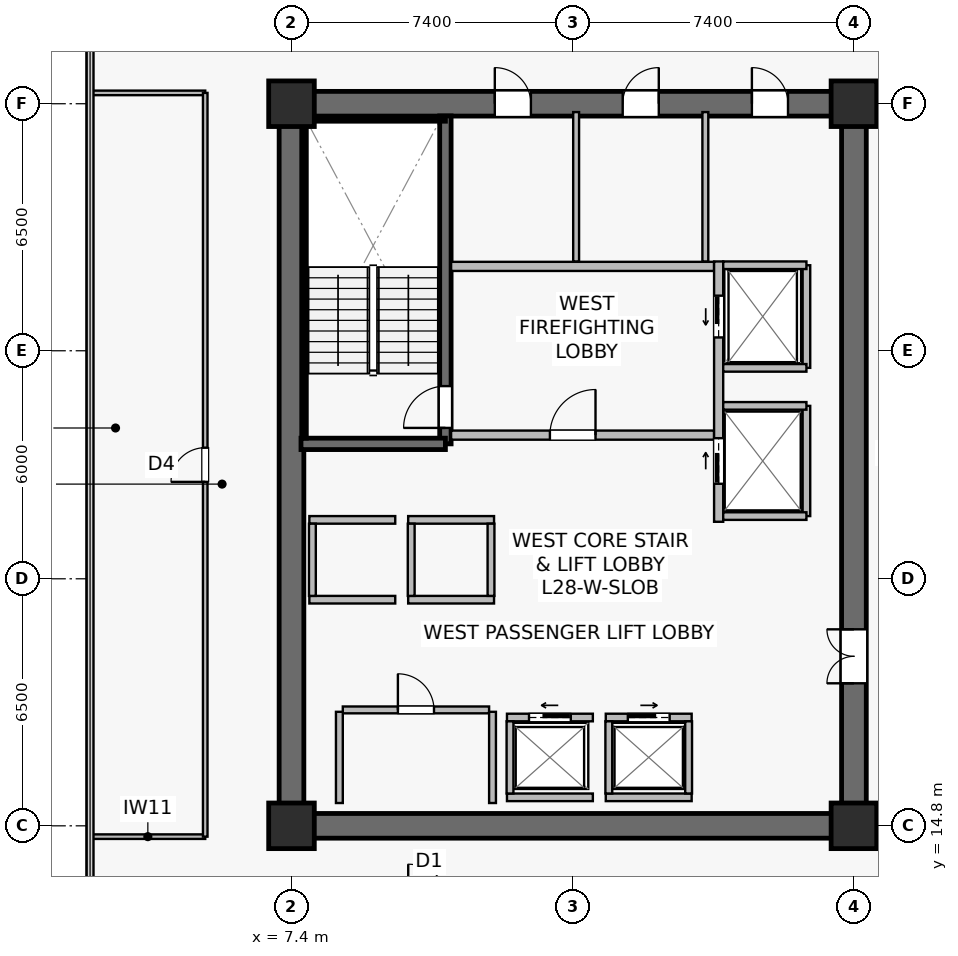
"""IFC4 building model, lengths in metres.
Left out: names, types, materials, properties, quantities, classifications, styles, units other than length and angle.
Written with IfcOpenShell. Run it as: python <this file> out.ifc"""

import sys

from ifc_helpers import new_model, si_unit, direction, frame, frame_2d, origin, origin_2d, place, context, subcontext, project, spatial, rectangle, extrude, source, transform, mapped, element, fill, save


model = new_model("IFC4")
c1 = context("Model", 3, precision=1e-05, world=origin(), true_north=direction((0.0, 1.0)))
c2 = subcontext(c1, "Body", "Model", "MODEL_VIEW")
j1 = project(units=[si_unit("LENGTHUNIT", "METRE"), si_unit("PLANEANGLEUNIT", "RADIAN")], contexts=[c1])
p1 = place(None, origin())
s1 = spatial("IfcSite", under=j1, at=p1, CompositionType="ELEMENT")
p2 = place(p1, origin())
s2 = spatial("IfcBuilding", under=s1, at=p2, CompositionType="ELEMENT")
p3 = place(p2, frame((0.0, 0.0, 117.4)))
s3 = spatial("IfcBuildingStorey", under=s2, at=p3, CompositionType="ELEMENT", Elevation=117.4)
p4 = place(p3, frame((7.075, 14.8, 0.0), z_axis=(0.0, 0.0, 1.0), x_axis=(1.0, 0.0, 0.0)))
e1 = element("IfcWall", 1, at=p4, inside=s3, PredefinedType="SHEAR", context=c2, shape_type="SweptSolid", body=[
    extrude(rectangle(XDim=15.45, YDim=0.65, at=frame_2d((7.725, 0.0))), origin(), (0.0, 0.0, 1.0), 3.79),
])
p5 = place(p3, frame((7.075, 33.8, 0.0), z_axis=(0.0, 0.0, 1.0), x_axis=(1.0, 0.0, 0.0)))
e2 = element("IfcWall", 2, at=p5, inside=s3, PredefinedType="SHEAR", context=c2, shape_type="SweptSolid", body=[
    extrude(rectangle(XDim=15.45, YDim=0.65, at=frame_2d((7.725, 0.0))), origin(), (0.0, 0.0, 1.0), 3.79),
])
p6 = place(p5, frame((5.675, 0.0, 0.0)))
e3 = element("IfcOpeningElement", 3, at=p6, cuts=e2, PredefinedType="OPENING", context=c2, shape_type="SweptSolid", body=[
    extrude(rectangle(XDim=0.95, YDim=2.15, at=frame_2d((0.475, 1.075))), frame((0.0, 0.335, 0.0), z_axis=(0.0, -1.0, 0.0), x_axis=(1.0, 0.0, 0.0)), (0.0, 0.0, 1.0), 0.67),
])
p7 = place(p5, frame((9.04, 0.0, 0.0)))
e4 = element("IfcOpeningElement", 4, at=p7, cuts=e2, PredefinedType="OPENING", context=c2, shape_type="SweptSolid", body=[
    extrude(rectangle(XDim=0.95, YDim=2.15, at=frame_2d((0.475, 1.075))), frame((0.0, 0.335, 0.0), z_axis=(0.0, -1.0, 0.0), x_axis=(1.0, 0.0, 0.0)), (0.0, 0.0, 1.0), 0.67),
])
p8 = place(p5, frame((12.44, 0.0, 0.0)))
e5 = element("IfcOpeningElement", 5, at=p8, cuts=e2, PredefinedType="OPENING", context=c2, shape_type="SweptSolid", body=[
    extrude(rectangle(XDim=0.95, YDim=2.15, at=frame_2d((0.475, 1.075))), frame((0.0, 0.335, 0.0), z_axis=(0.0, -1.0, 0.0), x_axis=(1.0, 0.0, 0.0)), (0.0, 0.0, 1.0), 0.67),
])
p9 = place(p3, frame((7.4, 15.125, 0.0), z_axis=(0.0, 0.0, 1.0), x_axis=(0.0, 1.0, 0.0)))
e6 = element("IfcWall", 6, at=p9, inside=s3, PredefinedType="SHEAR", context=c2, shape_type="SweptSolid", body=[
    extrude(rectangle(XDim=18.35, YDim=0.65, at=frame_2d((9.175, 0.0))), origin(), (0.0, 0.0, 1.0), 3.79),
])
p10 = place(p3, frame((22.2, 15.125, 0.0), z_axis=(0.0, 0.0, 1.0), x_axis=(0.0, 1.0, 0.0)))
e7 = element("IfcWall", 7, at=p10, inside=s3, PredefinedType="SHEAR", context=c2, shape_type="SweptSolid", body=[
    extrude(rectangle(XDim=18.35, YDim=0.65, at=frame_2d((9.175, 0.0))), origin(), (0.0, 0.0, 1.0), 3.79),
])
p11 = place(p10, frame((3.425, 0.0, 0.0)))
e8 = element("IfcOpeningElement", 8, at=p11, cuts=e7, PredefinedType="OPENING", context=c2, shape_type="SweptSolid", body=[
    extrude(rectangle(XDim=1.42, YDim=2.2, at=frame_2d((0.71, 1.1))), frame((0.0, 0.335, 0.0), z_axis=(0.0, -1.0, 0.0), x_axis=(1.0, 0.0, 0.0)), (0.0, 0.0, 1.0), 0.67),
])
p12 = place(p3, frame((11.45, 24.85, 0.0), z_axis=(0.0, 0.0, 1.0), x_axis=(0.0, 1.0, 0.0)))
e9 = element("IfcWall", 9, at=p12, inside=s3, PredefinedType="SHEAR", context=c2, shape_type="SweptSolid", body=[
    extrude(rectangle(XDim=8.63, YDim=0.3, at=frame_2d((4.315, 0.0))), origin(), (0.0, 0.0, 1.0), 3.79),
])
p13 = place(p12, frame((0.42, 0.0, 0.0)))
e10 = element("IfcOpeningElement", 10, at=p13, cuts=e9, PredefinedType="OPENING", context=c2, shape_type="SweptSolid", body=[
    extrude(rectangle(XDim=1.1, YDim=2.15, at=frame_2d((0.55, 1.075))), frame((0.0, 0.16, 0.0), z_axis=(0.0, -1.0, 0.0), x_axis=(1.0, 0.0, 0.0)), (0.0, 0.0, 1.0), 0.32),
])
p14 = place(p3, frame((7.65, 24.85, 0.0), z_axis=(0.0, 0.0, 1.0), x_axis=(1.0, 0.0, 0.0)))
e11 = element("IfcWall", 11, at=p14, inside=s3, PredefinedType="SHEAR", context=c2, shape_type="SweptSolid", body=[
    extrude(rectangle(XDim=3.8, YDim=0.3, at=frame_2d((1.9, 0.0))), origin(), (0.0, 0.0, 1.0), 3.79),
])
p15 = place(p3, frame((7.73, 33.4, 0.0), z_axis=(0.0, 0.0, 1.0), x_axis=(1.0, 0.0, 0.0)))
e12 = element("IfcWall", 12, at=p15, inside=s3, PredefinedType="SOLIDWALL", context=c2, shape_type="SweptSolid", body=[
    extrude(rectangle(XDim=3.72, YDim=0.12, at=frame_2d((1.86, 0.0))), origin(), (0.0, 0.0, 1.0), 3.79),
])
p16 = place(p3, frame((7.73, 25.0, 0.0), z_axis=(0.0, 0.0, 1.0), x_axis=(0.0, 1.0, 0.0)))
e13 = element("IfcWall", 13, at=p16, inside=s3, PredefinedType="SOLIDWALL", context=c2, shape_type="SweptSolid", body=[
    extrude(rectangle(XDim=8.32, YDim=0.12, at=frame_2d((4.16, 0.0))), origin(), (0.0, 0.0, 1.0), 3.79),
])
m1 = source(origin(), c2, "Body", "SweptSolid", [
    extrude(rectangle(XDim=1.2, YDim=1.2, at=origin_2d()), origin(), (0.0, 0.0, 1.0), 4.1),
])
for number, where, z_axis, x_axis in (
    (14, (7.4, 14.8, 0.0), (0.0, 0.0, 1.0), (1.0, 0.0, 0.0)),
    (15, (22.2, 14.8, 0.0), (0.0, 0.0, 1.0), (1.0, 0.0, 0.0)),
    (16, (7.4, 33.8, 0.0), (0.0, 0.0, 1.0), (1.0, 0.0, 0.0)),
    (17, (22.2, 33.8, 0.0), (0.0, 0.0, 1.0), (1.0, 0.0, 0.0)),
):
    element("IfcColumn", number, at=place(p3, frame(where, z_axis=z_axis, x_axis=x_axis)), inside=s3, PredefinedType="COLUMN", context=c2, shape_type="MappedRepresentation", body=[
        mapped(m1, transform((0.0, 0.0, 0.0), scale=1.0)),
    ])
p17 = place(p3, frame((11.6, 25.08, 0.0), z_axis=(0.0, 0.0, 1.0), x_axis=(1.0, 0.0, 0.0)))
e18 = element("IfcWall", 18, at=p17, inside=s3, PredefinedType="SOLIDWALL", context=c2, shape_type="SweptSolid", body=[
    extrude(rectangle(XDim=6.92, YDim=0.24, at=frame_2d((3.46, 0.0))), origin(), (0.0, 0.0, 1.0), 3.125),
])
p18 = place(p17, frame((2.6, 0.0, 0.0)))
e19 = element("IfcOpeningElement", 19, at=p18, cuts=e18, PredefinedType="OPENING", context=c2, shape_type="SweptSolid", body=[
    extrude(rectangle(XDim=1.2, YDim=2.16, at=frame_2d((0.6, 1.08))), frame((0.0, 0.13, 0.0), z_axis=(0.0, -1.0, 0.0), x_axis=(1.0, 0.0, 0.0)), (0.0, 0.0, 1.0), 0.26),
])
p19 = place(p3, frame((11.6, 29.52, 0.0), z_axis=(0.0, 0.0, 1.0), x_axis=(1.0, 0.0, 0.0)))
e20 = element("IfcWall", 20, at=p19, inside=s3, PredefinedType="SOLIDWALL", context=c2, shape_type="SweptSolid", body=[
    extrude(rectangle(XDim=6.92, YDim=0.24, at=frame_2d((3.46, 0.0))), origin(), (0.0, 0.0, 1.0), 3.125),
])
p20 = place(p3, frame((18.64, 22.8, 0.0), z_axis=(0.0, 0.0, 1.0), x_axis=(0.0, 1.0, 0.0)))
e21 = element("IfcWall", 21, at=p20, inside=s3, PredefinedType="SOLIDWALL", context=c2, shape_type="SweptSolid", body=[
    extrude(rectangle(XDim=6.85, YDim=0.24, at=frame_2d((3.425, 0.0))), origin(), (0.0, 0.0, 1.0), 2.875),
])
p21 = place(p20, frame((4.85, 0.0, 0.0)))
e22 = element("IfcOpeningElement", 22, at=p21, cuts=e21, PredefinedType="OPENING", context=c2, shape_type="SweptSolid", body=[
    extrude(rectangle(XDim=1.1, YDim=2.22, at=frame_2d((0.55, 1.11))), frame((0.0, 0.13, 0.0), z_axis=(0.0, -1.0, 0.0), x_axis=(1.0, 0.0, 0.0)), (0.0, 0.0, 1.0), 0.26),
])
p22 = place(p20, frame((1.0, 0.0, 0.0)))
e23 = element("IfcOpeningElement", 23, at=p22, cuts=e21, PredefinedType="OPENING", context=c2, shape_type="SweptSolid", body=[
    extrude(rectangle(XDim=1.2, YDim=2.22, at=frame_2d((0.6, 1.11))), frame((0.0, 0.13, 0.0), z_axis=(0.0, -1.0, 0.0), x_axis=(1.0, 0.0, 0.0)), (0.0, 0.0, 1.0), 0.26),
])
p23 = place(p3, frame((13.07, 17.65, 0.0), z_axis=(0.0, 0.0, 1.0), x_axis=(1.0, 0.0, 0.0)))
e24 = element("IfcWall", 24, at=p23, inside=s3, PredefinedType="SOLIDWALL", context=c2, shape_type="SweptSolid", body=[
    extrude(rectangle(XDim=2.26, YDim=0.2, at=frame_2d((1.13, 0.0))), origin(), (0.0, 0.0, 1.0), 3.125),
])
p24 = place(p23, frame((0.58, 0.0, 0.0)))
e25 = element("IfcOpeningElement", 25, at=p24, cuts=e24, PredefinedType="OPENING", context=c2, shape_type="SweptSolid", body=[
    extrude(rectangle(XDim=1.1, YDim=2.22, at=frame_2d((0.55, 1.11))), frame((0.0, 0.11, 0.0), z_axis=(0.0, -1.0, 0.0), x_axis=(1.0, 0.0, 0.0)), (0.0, 0.0, 1.0), 0.22),
])
p25 = place(p3, frame((13.07, 15.55, 0.0), z_axis=(0.0, 0.0, 1.0), x_axis=(1.0, 0.0, 0.0)))
e26 = element("IfcWall", 26, at=p25, inside=s3, PredefinedType="SOLIDWALL", context=c2, shape_type="SweptSolid", body=[
    extrude(rectangle(XDim=2.26, YDim=0.2, at=frame_2d((1.13, 0.0))), origin(), (0.0, 0.0, 1.0), 3.125),
])
p26 = place(p3, frame((13.15, 15.65, 0.0), z_axis=(0.0, 0.0, 1.0), x_axis=(0.0, 1.0, 0.0)))
e27 = element("IfcWall", 27, at=p26, inside=s3, PredefinedType="SOLIDWALL", context=c2, shape_type="SweptSolid", body=[
    extrude(rectangle(XDim=1.9, YDim=0.18, at=frame_2d((0.95, 0.0))), origin(), (0.0, 0.0, 1.0), 3.79),
])
p27 = place(p3, frame((15.67, 17.65, 0.0), z_axis=(0.0, 0.0, 1.0), x_axis=(1.0, 0.0, 0.0)))
e28 = element("IfcWall", 28, at=p27, inside=s3, PredefinedType="SOLIDWALL", context=c2, shape_type="SweptSolid", body=[
    extrude(rectangle(XDim=2.26, YDim=0.2, at=frame_2d((1.13, 0.0))), origin(), (0.0, 0.0, 1.0), 3.79),
])
p28 = place(p27, frame((0.58, 0.0, 0.0)))
e29 = element("IfcOpeningElement", 29, at=p28, cuts=e28, PredefinedType="OPENING", context=c2, shape_type="SweptSolid", body=[
    extrude(rectangle(XDim=1.1, YDim=2.22, at=frame_2d((0.55, 1.11))), frame((0.0, 0.11, 0.0), z_axis=(0.0, -1.0, 0.0), x_axis=(1.0, 0.0, 0.0)), (0.0, 0.0, 1.0), 0.22),
])
p29 = place(p3, frame((15.67, 15.55, 0.0), z_axis=(0.0, 0.0, 1.0), x_axis=(1.0, 0.0, 0.0)))
e30 = element("IfcWall", 30, at=p29, inside=s3, PredefinedType="SOLIDWALL", context=c2, shape_type="SweptSolid", body=[
    extrude(rectangle(XDim=2.26, YDim=0.2, at=frame_2d((1.13, 0.0))), origin(), (0.0, 0.0, 1.0), 3.79),
])
for number, where, z_axis, x_axis in (
    (31, (15.75, 15.65, 0.0), (0.0, 0.0, 1.0), (0.0, 1.0, 0.0)),
    (32, (17.85, 15.65, 0.0), (0.0, 0.0, 1.0), (0.0, 1.0, 0.0)),
):
    element("IfcWall", number, at=place(p3, frame(where, z_axis=z_axis, x_axis=x_axis)), inside=s3, PredefinedType="SOLIDWALL", context=c2, shape_type="SweptSolid", body=[
        extrude(rectangle(XDim=1.9, YDim=0.18, at=frame_2d((0.95, 0.0))), origin(), (0.0, 0.0, 1.0), 3.79),
    ])
for number, where, z_axis, x_axis in (
    (33, (7.87, 20.75, 0.0), (0.0, 0.0, 1.0), (1.0, 0.0, 0.0)),
    (34, (7.87, 22.85, 0.0), (0.0, 0.0, 1.0), (1.0, 0.0, 0.0)),
):
    element("IfcWall", number, at=place(p3, frame(where, z_axis=z_axis, x_axis=x_axis)), inside=s3, PredefinedType="SOLIDWALL", context=c2, shape_type="SweptSolid", body=[
        extrude(rectangle(XDim=2.26, YDim=0.2, at=frame_2d((1.13, 0.0))), origin(), (0.0, 0.0, 1.0), 3.79),
    ])
p30 = place(p3, frame((7.95, 20.85, 0.0), z_axis=(0.0, 0.0, 1.0), x_axis=(0.0, 1.0, 0.0)))
e35 = element("IfcWall", 35, at=p30, inside=s3, PredefinedType="SOLIDWALL", context=c2, shape_type="SweptSolid", body=[
    extrude(rectangle(XDim=1.9, YDim=0.18, at=frame_2d((0.95, 0.0))), origin(), (0.0, 0.0, 1.0), 3.79),
])
for number, where, z_axis, x_axis in (
    (36, (10.47, 20.75, 0.0), (0.0, 0.0, 1.0), (1.0, 0.0, 0.0)),
    (37, (10.47, 22.85, 0.0), (0.0, 0.0, 1.0), (1.0, 0.0, 0.0)),
):
    element("IfcWall", number, at=place(p3, frame(where, z_axis=z_axis, x_axis=x_axis)), inside=s3, PredefinedType="SOLIDWALL", context=c2, shape_type="SweptSolid", body=[
        extrude(rectangle(XDim=2.26, YDim=0.2, at=frame_2d((1.13, 0.0))), origin(), (0.0, 0.0, 1.0), 3.79),
    ])
for number, where, z_axis, x_axis in (
    (38, (10.55, 20.85, 0.0), (0.0, 0.0, 1.0), (0.0, 1.0, 0.0)),
    (39, (12.65, 20.85, 0.0), (0.0, 0.0, 1.0), (0.0, 1.0, 0.0)),
):
    element("IfcWall", number, at=place(p3, frame(where, z_axis=z_axis, x_axis=x_axis)), inside=s3, PredefinedType="SOLIDWALL", context=c2, shape_type="SweptSolid", body=[
        extrude(rectangle(XDim=1.9, YDim=0.18, at=frame_2d((0.95, 0.0))), origin(), (0.0, 0.0, 1.0), 3.79),
    ])
p31 = place(p3, frame((20.95, 26.85, 0.0), z_axis=(0.0, 0.0, 1.0), x_axis=(0.0, 1.0, 0.0)))
e40 = element("IfcWall", 40, at=p31, inside=s3, PredefinedType="SOLIDWALL", context=c2, shape_type="SweptSolid", body=[
    extrude(rectangle(XDim=2.7, YDim=0.2, at=frame_2d((1.35, 0.0))), origin(), (0.0, 0.0, 1.0), 3.79),
])
p32 = place(p3, frame((18.76, 29.55, 0.0), z_axis=(0.0, 0.0, 1.0), x_axis=(1.0, 0.0, 0.0)))
e41 = element("IfcWall", 41, at=p32, inside=s3, PredefinedType="SOLIDWALL", context=c2, shape_type="SweptSolid", body=[
    extrude(rectangle(XDim=2.19, YDim=0.2, at=frame_2d((1.095, 0.0))), origin(), (0.0, 0.0, 1.0), 3.79),
])
p33 = place(p3, frame((18.76, 26.85, 0.0), z_axis=(0.0, 0.0, 1.0), x_axis=(1.0, 0.0, 0.0)))
e42 = element("IfcWall", 42, at=p33, inside=s3, PredefinedType="SOLIDWALL", context=c2, shape_type="SweptSolid", body=[
    extrude(rectangle(XDim=2.19, YDim=0.2, at=frame_2d((1.095, 0.0))), origin(), (0.0, 0.0, 1.0), 3.187),
])
p34 = place(p3, frame((20.95, 22.95, 0.0), z_axis=(0.0, 0.0, 1.0), x_axis=(0.0, 1.0, 0.0)))
e43 = element("IfcWall", 43, at=p34, inside=s3, PredefinedType="SOLIDWALL", context=c2, shape_type="SweptSolid", body=[
    extrude(rectangle(XDim=2.9, YDim=0.2, at=frame_2d((1.45, 0.0))), origin(), (0.0, 0.0, 1.0), 2.875),
])
for number, where, z_axis, x_axis in (
    (44, (18.76, 25.85, 0.0), (0.0, 0.0, 1.0), (1.0, 0.0, 0.0)),
    (45, (18.76, 22.95, 0.0), (0.0, 0.0, 1.0), (1.0, 0.0, 0.0)),
):
    element("IfcWall", number, at=place(p3, frame(where, z_axis=z_axis, x_axis=x_axis)), inside=s3, PredefinedType="SOLIDWALL", context=c2, shape_type="SweptSolid", body=[
        extrude(rectangle(XDim=2.19, YDim=0.2, at=frame_2d((1.095, 0.0))), origin(), (0.0, 0.0, 1.0), 3.79),
    ])
p35 = place(p3, frame((8.75, 17.85, 0.0), z_axis=(0.0, 0.0, 1.0), x_axis=(1.0, 0.0, 0.0)))
e46 = element("IfcWall", 46, at=p35, inside=s3, PredefinedType="SOLIDWALL", context=c2, shape_type="SweptSolid", body=[
    extrude(rectangle(XDim=3.85, YDim=0.18, at=frame_2d((1.925, 0.0))), origin(), (0.0, 0.0, 1.0), 3.79),
])
p36 = place(p35, frame((1.45, 0.0, 0.0)))
e47 = element("IfcOpeningElement", 47, at=p36, cuts=e46, PredefinedType="OPENING", context=c2, shape_type="SweptSolid", body=[
    extrude(rectangle(XDim=0.95, YDim=2.15, at=frame_2d((0.475, 1.075))), frame((0.0, 0.1, 0.0), z_axis=(0.0, -1.0, 0.0), x_axis=(1.0, 0.0, 0.0)), (0.0, 0.0, 1.0), 0.2),
])
for number, where, z_axis, x_axis in (
    (48, (12.69, 15.4, 0.0), (0.0, 0.0, 1.0), (0.0, 1.0, 0.0)),
    (49, (8.66, 15.4, 0.0), (0.0, 0.0, 1.0), (0.0, 1.0, 0.0)),
):
    element("IfcWall", number, at=place(p3, frame(where, z_axis=z_axis, x_axis=x_axis)), inside=s3, PredefinedType="SOLIDWALL", context=c2, shape_type="SweptSolid", body=[
        extrude(rectangle(XDim=2.4, YDim=0.18, at=frame_2d((1.2, 0.0))), origin(), (0.0, 0.0, 1.0), 3.79),
    ])
p37 = place(p3, frame((14.89, 29.65, 0.0), z_axis=(0.0, 0.0, 1.0), x_axis=(0.0, 1.0, 0.0)))
e50 = element("IfcWall", 50, at=p37, inside=s3, PredefinedType="PLUMBINGWALL", context=c2, shape_type="SweptSolid", body=[
    extrude(rectangle(XDim=3.93, YDim=0.155, at=frame_2d((1.965, 0.0))), origin(), (0.0, 0.0, 1.0), 3.125),
])
p38 = place(p3, frame((18.29, 29.65, 0.0), z_axis=(0.0, 0.0, 1.0), x_axis=(0.0, 1.0, 0.0)))
e51 = element("IfcWall", 51, at=p38, inside=s3, PredefinedType="PLUMBINGWALL", context=c2, shape_type="SweptSolid", body=[
    extrude(rectangle(XDim=3.93, YDim=0.155, at=frame_2d((1.965, 0.0))), origin(), (0.0, 0.0, 1.0), 3.79),
])
for number, where, z_axis, x_axis in (
    (52, (2.11, 14.515, 0.0), (0.0, 0.0, 1.0), (1.0, 0.0, 0.0)),
    (53, (2.11, 34.085, 0.0), (0.0, 0.0, 1.0), (1.0, 0.0, 0.0)),
):
    element("IfcWall", number, at=place(p3, frame(where, z_axis=z_axis, x_axis=x_axis)), inside=s3, PredefinedType="PARTITIONING", context=c2, shape_type="SweptSolid", body=[
        extrude(rectangle(XDim=3.02, YDim=0.12, at=frame_2d((1.51, 0.0))), origin(), (0.0, 0.0, 1.0), 3.79),
    ])
p39 = place(p3, frame((5.13, 14.515, 0.0), z_axis=(0.0, 0.0, 1.0), x_axis=(0.0, 1.0, 0.0)))
e54 = element("IfcWall", 54, at=p39, inside=s3, PredefinedType="PARTITIONING", context=c2, shape_type="SweptSolid", body=[
    extrude(rectangle(XDim=19.57, YDim=0.12, at=frame_2d((9.785, 0.0))), origin(), (0.0, 0.0, 1.0), 3.79),
])
p40 = place(p39, frame((9.335, 0.0, 0.0)))
e55 = element("IfcOpeningElement", 55, at=p40, cuts=e54, PredefinedType="OPENING", context=c2, shape_type="SweptSolid", body=[
    extrude(rectangle(XDim=0.9, YDim=2.1, at=frame_2d((0.45, 1.05))), frame((0.0, 0.07, 0.0), z_axis=(0.0, -1.0, 0.0), x_axis=(1.0, 0.0, 0.0)), (0.0, 0.0, 1.0), 0.14),
])
m2 = source(origin(), c2, "Body", "SweptSolid", [
    extrude(rectangle(XDim=1.1, YDim=2.15, at=frame_2d((0.55, 1.075))), frame((0.0, 0.025, 0.0), z_axis=(0.0, -1.0, 0.0), x_axis=(1.0, 0.0, 0.0)), (0.0, 0.0, 1.0), 0.05),
])
p41 = place(p13, origin())
e56 = element("IfcDoor", 56, at=p41, inside=s3, OperationType="SINGLE_SWING_LEFT", PredefinedType="DOOR", context=c2, shape_type="MappedRepresentation", body=[
    mapped(m2, transform((0.0, 0.0, 0.0), scale=1.0)),
])
fill(e10, e56)
m3 = source(origin(), c2, "Body", "SweptSolid", [
    extrude(rectangle(XDim=1.2, YDim=2.16, at=frame_2d((0.6, 1.08))), frame((0.0, 0.025, 0.0), z_axis=(0.0, -1.0, 0.0), x_axis=(1.0, 0.0, 0.0)), (0.0, 0.0, 1.0), 0.05),
])
p42 = place(p18, origin())
e57 = element("IfcDoor", 57, at=p42, inside=s3, OperationType="SINGLE_SWING_RIGHT", PredefinedType="DOOR", context=c2, shape_type="MappedRepresentation", body=[
    mapped(m3, transform((0.0, 0.0, 0.0), scale=1.0)),
])
fill(e19, e57)
m4 = source(origin(), c2, "Body", "SweptSolid", [
    extrude(rectangle(XDim=1.1, YDim=2.22, at=frame_2d((0.55, 1.11))), frame((0.0, 0.025, 0.0), z_axis=(0.0, -1.0, 0.0), x_axis=(1.0, 0.0, 0.0)), (0.0, 0.0, 1.0), 0.05),
])
p43 = place(p24, origin())
e58 = element("IfcDoor", 58, at=p43, inside=s3, OperationType="SLIDING_TO_LEFT", PredefinedType="USERDEFINED", context=c2, shape_type="MappedRepresentation", body=[
    mapped(m4, transform((0.0, 0.0, 0.0), scale=1.0)),
])
fill(e25, e58)
p44 = place(p28, origin())
e59 = element("IfcDoor", 59, at=p44, inside=s3, OperationType="SLIDING_TO_RIGHT", PredefinedType="USERDEFINED", context=c2, shape_type="MappedRepresentation", body=[
    mapped(m4, transform((0.0, 0.0, 0.0), scale=1.0)),
])
fill(e29, e59)
p45 = place(p21, origin())
e60 = element("IfcDoor", 60, at=p45, inside=s3, OperationType="SLIDING_TO_LEFT", PredefinedType="USERDEFINED", context=c2, shape_type="MappedRepresentation", body=[
    mapped(m4, transform((0.0, 0.0, 0.0), scale=1.0)),
])
fill(e22, e60)
m5 = source(origin(), c2, "Body", "SweptSolid", [
    extrude(rectangle(XDim=1.2, YDim=2.22, at=frame_2d((0.6, 1.11))), frame((0.0, 0.025, 0.0), z_axis=(0.0, -1.0, 0.0), x_axis=(1.0, 0.0, 0.0)), (0.0, 0.0, 1.0), 0.05),
])
p46 = place(p22, origin())
e61 = element("IfcDoor", 61, at=p46, inside=s3, OperationType="SLIDING_TO_RIGHT", PredefinedType="USERDEFINED", context=c2, shape_type="MappedRepresentation", body=[
    mapped(m5, transform((0.0, 0.0, 0.0), scale=1.0)),
])
fill(e23, e61)
m6 = source(origin(), c2, "Body", "SweptSolid", [
    extrude(rectangle(XDim=0.95, YDim=2.15, at=frame_2d((0.475, 1.075))), frame((0.0, 0.025, 0.0), z_axis=(0.0, -1.0, 0.0), x_axis=(1.0, 0.0, 0.0)), (0.0, 0.0, 1.0), 0.05),
])
p47 = place(p36, origin())
e62 = element("IfcDoor", 62, at=p47, inside=s3, OperationType="SINGLE_SWING_LEFT", PredefinedType="DOOR", context=c2, shape_type="MappedRepresentation", body=[
    mapped(m6, transform((0.0, 0.0, 0.0), scale=1.0)),
])
fill(e47, e62)
m7 = source(origin(), c2, "Body", "SweptSolid", [
    extrude(rectangle(XDim=1.42, YDim=2.2, at=frame_2d((0.71, 1.1))), frame((0.0, 0.025, 0.0), z_axis=(0.0, -1.0, 0.0), x_axis=(1.0, 0.0, 0.0)), (0.0, 0.0, 1.0), 0.05),
])
p48 = place(p11, origin())
e63 = element("IfcDoor", 63, at=p48, inside=s3, OperationType="DOUBLE_DOOR_SINGLE_SWING", PredefinedType="DOOR", context=c2, shape_type="MappedRepresentation", body=[
    mapped(m7, transform((0.0, 0.0, 0.0), scale=1.0)),
])
fill(e8, e63)
p49 = place(p6, origin())
e64 = element("IfcDoor", 64, at=p49, inside=s3, OperationType="SINGLE_SWING_LEFT", PredefinedType="DOOR", context=c2, shape_type="MappedRepresentation", body=[
    mapped(m6, transform((0.0, 0.0, 0.0), scale=1.0)),
])
fill(e3, e64)
p50 = place(p7, origin())
e65 = element("IfcDoor", 65, at=p50, inside=s3, OperationType="SINGLE_SWING_RIGHT", PredefinedType="DOOR", context=c2, shape_type="MappedRepresentation", body=[
    mapped(m6, transform((0.0, 0.0, 0.0), scale=1.0)),
])
fill(e4, e65)
p51 = place(p8, origin())
e66 = element("IfcDoor", 66, at=p51, inside=s3, OperationType="SINGLE_SWING_LEFT", PredefinedType="DOOR", context=c2, shape_type="MappedRepresentation", body=[
    mapped(m6, transform((0.0, 0.0, 0.0), scale=1.0)),
])
fill(e5, e66)
m8 = source(origin(), c2, "Body", "SweptSolid", [
    extrude(rectangle(XDim=0.9, YDim=2.1, at=frame_2d((0.45, 1.05))), frame((0.0, 0.025, 0.0), z_axis=(0.0, -1.0, 0.0), x_axis=(1.0, 0.0, 0.0)), (0.0, 0.0, 1.0), 0.05),
])
p52 = place(p40, origin())
e67 = element("IfcDoor", 67, at=p52, inside=s3, OperationType="SINGLE_SWING_LEFT", PredefinedType="DOOR", context=c2, shape_type="MappedRepresentation", body=[
    mapped(m8, transform((0.0, 0.0, 0.0), scale=1.0)),
])
fill(e55, e67)
save(model, sys.argv[1])
